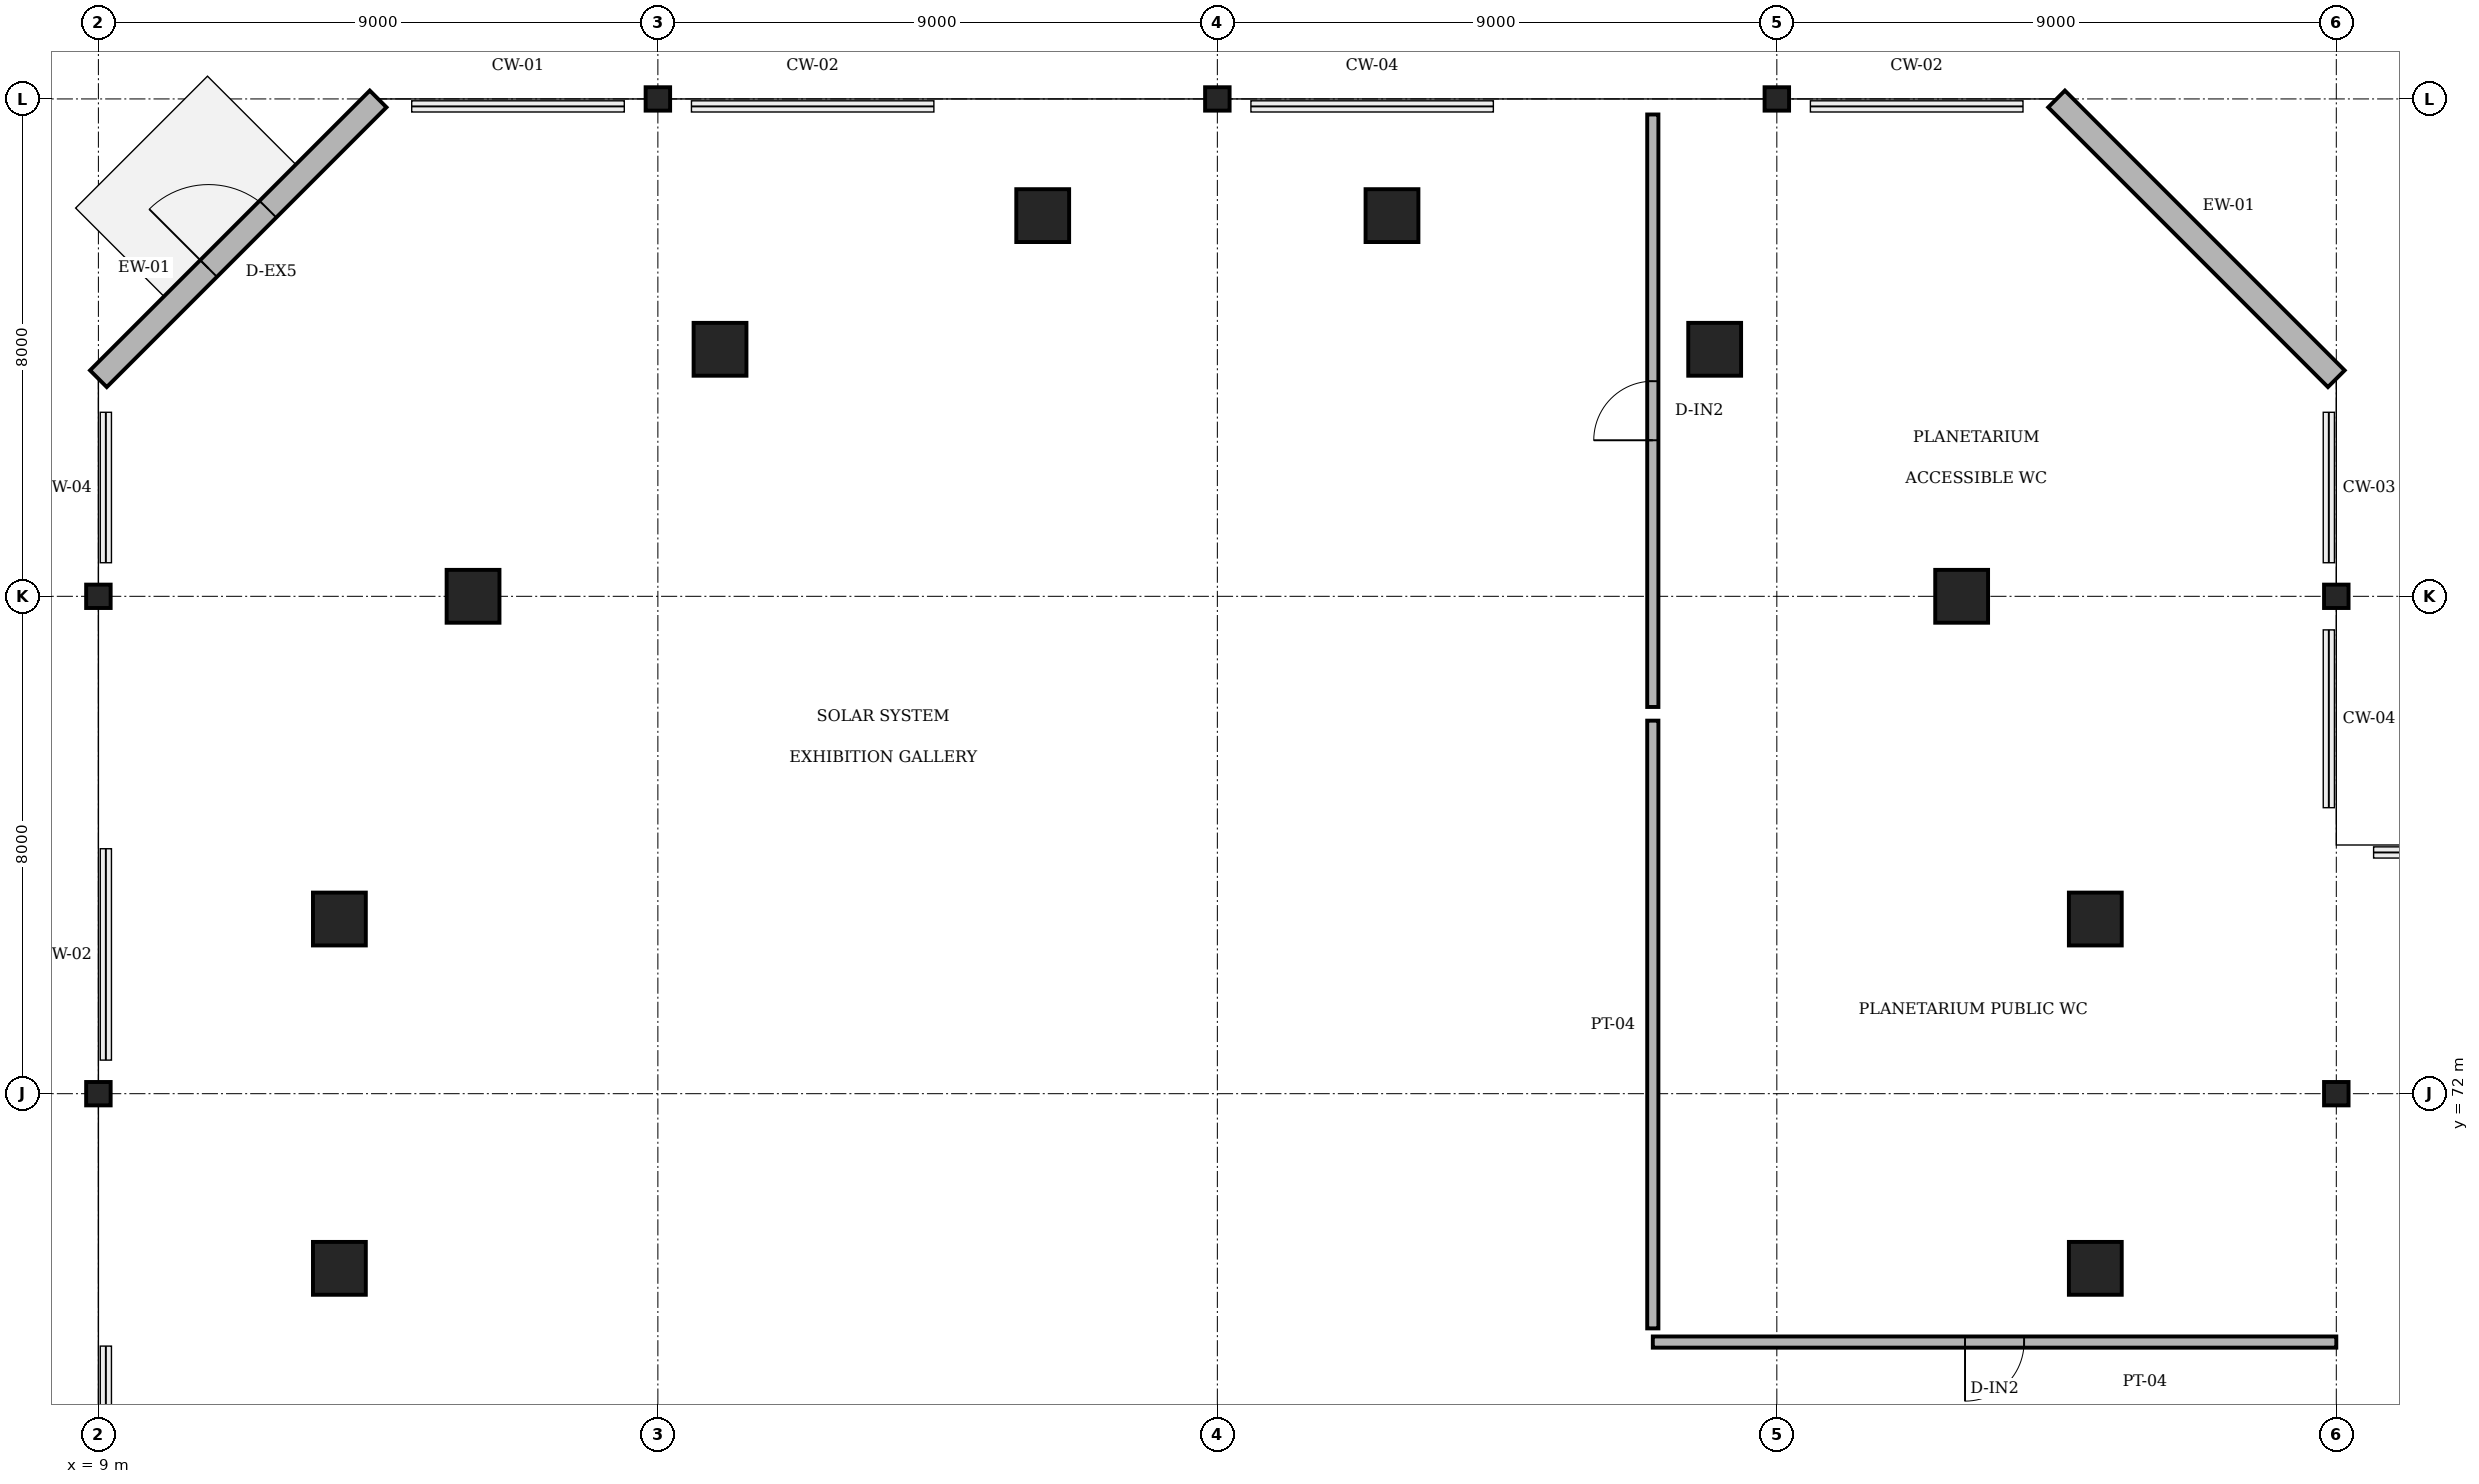
"""IFC4 building model, lengths in metres.
Left out: names, types, materials, properties, quantities, classifications, styles, units other than length and angle.
Written with IfcOpenShell. Run it as: python <this file> out.ifc"""

import sys

from ifc_helpers import new_model, si_unit, direction, frame, frame_2d, origin, origin_2d, place, context, subcontext, project, spatial, rectangle, i_section, extrude, element, fill, save


model = new_model("IFC4")
c1 = context("Model", 3, precision=1e-05, world=origin(), true_north=direction((0.0, 1.0)))
c2 = subcontext(c1, "Body", "Model", "MODEL_VIEW")
j1 = project(units=[si_unit("LENGTHUNIT", "METRE"), si_unit("PLANEANGLEUNIT", "RADIAN")], contexts=[c1])
p1 = place(None, origin())
s1 = spatial("IfcSite", under=j1, at=p1, CompositionType="ELEMENT")
p2 = place(p1, origin())
s2 = spatial("IfcBuilding", under=s1, at=p2, CompositionType="ELEMENT")
p3 = place(p2, origin())
s3 = spatial("IfcBuildingStorey", under=s2, at=p3, CompositionType="ELEMENT", Elevation=0.0)
for number, where, z_axis, x_axis in (
    (1, (41.123, 74.809, 0.0), (0.0, 0.0, 1.0), (1.0, 0.0, 0.0)),
    (2, (38.973, 80.0, 0.0), (0.0, 0.0, 1.0), (1.0, 0.0, 0.0)),
    (3, (35.0, 83.973, 0.0), (0.0, 0.0, 1.0), (1.0, 0.0, 0.0)),
    (4, (29.809, 86.123, 0.0), (0.0, 0.0, 1.0), (1.0, 0.0, 0.0)),
    (5, (24.191, 86.123, 0.0), (0.0, 0.0, 1.0), (1.0, 0.0, 0.0)),
    (6, (19.0, 83.973, 0.0), (0.0, 0.0, 1.0), (1.0, 0.0, 0.0)),
    (7, (15.027, 80.0, 0.0), (0.0, 0.0, 1.0), (1.0, 0.0, 0.0)),
    (8, (12.877, 74.809, 0.0), (0.0, 0.0, 1.0), (1.0, 0.0, 0.0)),
    (9, (12.877, 69.191, 0.0), (0.0, 0.0, 1.0), (1.0, 0.0, 0.0)),
    (10, (41.123, 69.191, 0.0), (0.0, 0.0, 1.0), (1.0, 0.0, 0.0)),
):
    element("IfcColumn", number, at=place(p3, frame(where, z_axis=z_axis, x_axis=x_axis)), inside=s3, PredefinedType="COLUMN", context=c2, shape_type="SweptSolid", body=[
        extrude(rectangle(XDim=0.85, YDim=0.85, at=origin_2d()), origin(), (0.0, 0.0, 1.0), 5.4),
    ])
for number, where, z_axis, x_axis in (
    (11, (18.0, 88.0, 0.0), (0.0, 0.0, 1.0), (1.0, 0.0, 0.0)),
    (12, (27.0, 88.0, 0.0), (0.0, 0.0, 1.0), (1.0, 0.0, 0.0)),
    (13, (36.0, 88.0, 0.0), (0.0, 0.0, 1.0), (1.0, 0.0, 0.0)),
    (14, (9.0, 72.0, 0.0), (0.0, 0.0, 1.0), (1.0, 0.0, 0.0)),
    (15, (9.0, 80.0, 0.0), (0.0, 0.0, 1.0), (1.0, 0.0, 0.0)),
    (16, (45.0, 72.0, 0.0), (0.0, 0.0, 1.0), (1.0, 0.0, 0.0)),
    (17, (45.0, 80.0, 0.0), (0.0, 0.0, 1.0), (1.0, 0.0, 0.0)),
):
    element("IfcColumn", number, at=place(p3, frame(where, z_axis=z_axis, x_axis=x_axis)), inside=s3, PredefinedType="COLUMN", context=c2, shape_type="SweptSolid", body=[
        extrude(i_section(OverallWidth=0.394, OverallDepth=0.376, WebThickness=0.017, FlangeThickness=0.028, FilletRadius=0.015, at=origin_2d()), origin(), (0.0, 0.0, 1.0), 5.4),
    ])
p4 = place(p3, frame((9.0, 83.5, 0.0), z_axis=(0.0, 0.0, 1.0), x_axis=(0.707106781187, 0.707106781187, 0.0)))
e18 = element("IfcWall", 18, at=p4, inside=s3, PredefinedType="SOLIDWALL", context=c2, shape_type="SweptSolid", body=[
    extrude(rectangle(XDim=6.364, YDim=0.38, at=frame_2d((3.182, 0.0))), origin(), (0.0, 0.0, 1.0), 4.7),
])
p5 = place(p4, frame((2.507, 0.0, 0.0)))
e19 = element("IfcOpeningElement", 19, at=p5, cuts=e18, PredefinedType="OPENING", context=c2, shape_type="SweptSolid", body=[
    extrude(rectangle(XDim=1.35, YDim=2.2, at=frame_2d((0.675, 1.1))), frame((0.0, 0.2, 0.0), z_axis=(0.0, -1.0, 0.0), x_axis=(1.0, 0.0, 0.0)), (0.0, 0.0, 1.0), 0.4),
])
p6 = place(p3, frame((40.5, 88.0, 0.0), z_axis=(0.0, 0.0, 1.0), x_axis=(0.707106781187, -0.707106781187, 0.0)))
e20 = element("IfcWall", 20, at=p6, inside=s3, PredefinedType="SOLIDWALL", context=c2, shape_type="SweptSolid", body=[
    extrude(rectangle(XDim=6.364, YDim=0.38, at=frame_2d((3.182, 0.0))), origin(), (0.0, 0.0, 1.0), 4.7),
])
p7 = place(p3, frame((45.0, 68.005, 0.0), z_axis=(0.0, 0.0, 1.0), x_axis=(-1.0, 0.0, 0.0)))
e21 = element("IfcWall", 21, at=p7, inside=s3, PredefinedType="PARTITIONING", context=c2, shape_type="SweptSolid", body=[
    extrude(rectangle(XDim=10.995, YDim=0.18, at=frame_2d((5.498, 0.0))), origin(), (0.0, 0.0, 1.0), 3.15),
])
p8 = place(p7, frame((5.022, 0.0, 0.0)))
e22 = element("IfcOpeningElement", 22, at=p8, cuts=e21, PredefinedType="OPENING", context=c2, shape_type="SweptSolid", body=[
    extrude(rectangle(XDim=0.95, YDim=2.15, at=frame_2d((0.475, 1.075))), frame((0.0, 0.1, 0.0), z_axis=(0.0, -1.0, 0.0), x_axis=(1.0, 0.0, 0.0)), (0.0, 0.0, 1.0), 0.2),
])
p9 = place(p3, frame((34.005, 68.225, 0.0), z_axis=(0.0, 0.0, 1.0), x_axis=(0.0, 1.0, 0.0)))
e23 = element("IfcWall", 23, at=p9, inside=s3, PredefinedType="PARTITIONING", context=c2, shape_type="SweptSolid", body=[
    extrude(rectangle(XDim=9.775, YDim=0.18, at=frame_2d((4.887, 0.0))), origin(), (0.0, 0.0, 1.0), 3.15),
])
p10 = place(p3, frame((34.005, 78.22, 0.0), z_axis=(0.0, 0.0, 1.0), x_axis=(0.0, 1.0, 0.0)))
e24 = element("IfcWall", 24, at=p10, inside=s3, PredefinedType="PARTITIONING", context=c2, shape_type="SweptSolid", body=[
    extrude(rectangle(XDim=9.53, YDim=0.18, at=frame_2d((4.765, 0.0))), origin(), (0.0, 0.0, 1.0), 3.15),
])
p11 = place(p10, frame((4.29, 0.0, 0.0)))
e25 = element("IfcOpeningElement", 25, at=p11, cuts=e24, PredefinedType="OPENING", context=c2, shape_type="SweptSolid", body=[
    extrude(rectangle(XDim=0.95, YDim=2.15, at=frame_2d((0.475, 1.075))), frame((0.0, 0.1, 0.0), z_axis=(0.0, -1.0, 0.0), x_axis=(1.0, 0.0, 0.0)), (0.0, 0.0, 1.0), 0.2),
])
p12 = place(p5, origin())
e26 = element("IfcDoor", 26, at=p12, inside=s3, OperationType="SINGLE_SWING_LEFT", PredefinedType="DOOR", context=c2, shape_type="SweptSolid", body=[
    extrude(rectangle(XDim=1.35, YDim=2.2, at=frame_2d((0.675, 1.1))), frame((0.0, 0.025, 0.0), z_axis=(0.0, -1.0, 0.0), x_axis=(1.0, 0.0, 0.0)), (0.0, 0.0, 1.0), 0.05),
])
fill(e19, e26)
p13 = place(p8, origin())
e27 = element("IfcDoor", 27, at=p13, inside=s3, OperationType="SINGLE_SWING_RIGHT", PredefinedType="DOOR", context=c2, shape_type="SweptSolid", body=[
    extrude(rectangle(XDim=0.95, YDim=2.15, at=frame_2d((0.475, 1.075))), frame((0.0, 0.025, 0.0), z_axis=(0.0, -1.0, 0.0), x_axis=(1.0, 0.0, 0.0)), (0.0, 0.0, 1.0), 0.05),
])
fill(e22, e27)
p14 = place(p11, origin())
e28 = element("IfcDoor", 28, at=p14, inside=s3, OperationType="SINGLE_SWING_LEFT", PredefinedType="DOOR", context=c2, shape_type="SweptSolid", body=[
    extrude(rectangle(XDim=0.95, YDim=2.15, at=frame_2d((0.475, 1.075))), frame((0.0, 0.025, 0.0), z_axis=(0.0, -1.0, 0.0), x_axis=(1.0, 0.0, 0.0)), (0.0, 0.0, 1.0), 0.05),
])
fill(e25, e28)
save(model, sys.argv[1])
